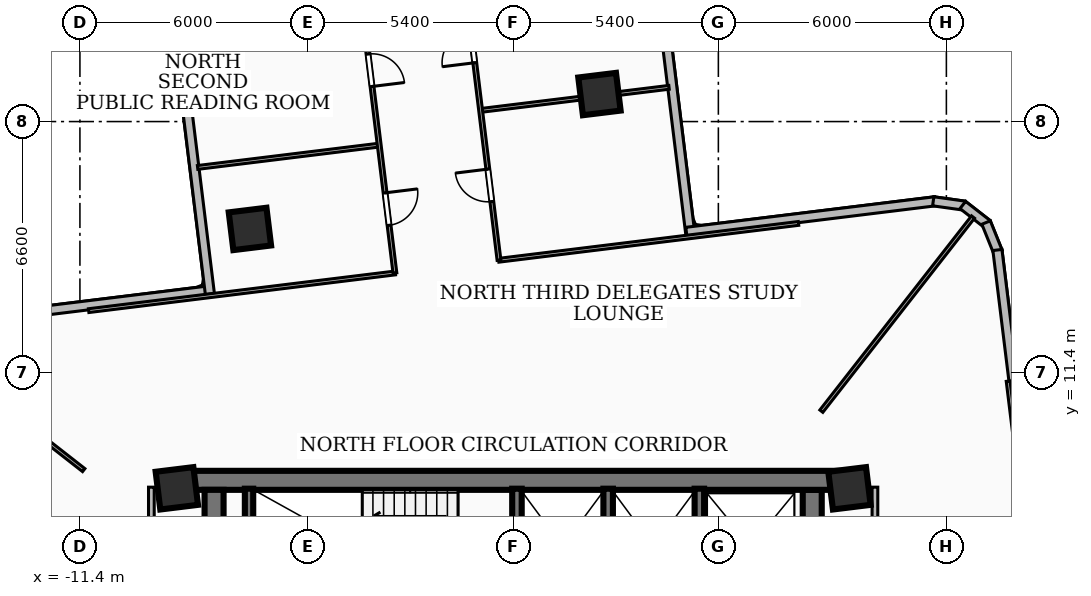
"""IFC4 building model, lengths in metres.
Left out: names, types, materials, properties, quantities, classifications, styles, units other than length and angle.
Written with IfcOpenShell. Run it as: python <this file> out.ifc"""

import sys

from ifc_helpers import new_model, si_unit, direction, frame, frame_2d, origin, origin_2d, place, context, subcontext, project, spatial, rectangle, extrude, element, fill, save


model = new_model("IFC4")
c1 = context("Model", 3, precision=1e-05, world=origin(), true_north=direction((0.0, 1.0)))
c2 = subcontext(c1, "Body", "Model", "MODEL_VIEW")
j1 = project(units=[si_unit("LENGTHUNIT", "METRE"), si_unit("PLANEANGLEUNIT", "RADIAN")], contexts=[c1])
p1 = place(None, origin())
s1 = spatial("IfcSite", under=j1, at=p1, CompositionType="ELEMENT")
p2 = place(p1, origin())
s2 = spatial("IfcBuilding", under=s1, at=p2, CompositionType="ELEMENT")
p3 = place(p2, frame((0.0, 0.0, 82.08)))
s3 = spatial("IfcBuildingStorey", under=s2, at=p3, CompositionType="ELEMENT", Elevation=82.08)
p4 = place(p3, frame((-8.78, 8.56, 0.0), z_axis=(0.0, 0.0, 1.0), x_axis=(1.0, 0.0, 0.0)))
e1 = element("IfcWall", 1, at=p4, inside=s3, PredefinedType="SHEAR", context=c2, shape_type="SweptSolid", body=[
    extrude(rectangle(XDim=17.56, YDim=0.5, at=frame_2d((8.78, 0.0))), origin(), (0.0, 0.0, 1.0), 3.34),
])
for number, where, z_axis, x_axis in (
    (2, (-7.87, 2.0, 0.0), (0.0, 0.0, 1.0), (0.0, 1.0, 0.0)),
    (3, (7.87, 8.31, 0.0), (0.0, 0.0, 1.0), (0.0, -1.0, 0.0)),
):
    element("IfcWall", number, at=place(p3, frame(where, z_axis=z_axis, x_axis=x_axis)), inside=s3, PredefinedType="SHEAR", context=c2, shape_type="SweptSolid", body=[
        extrude(rectangle(XDim=6.31, YDim=0.5, at=frame_2d((3.155, 0.0))), origin(), (0.0, 0.0, 1.0), 3.34),
    ])
p5 = place(p3, frame((-6.95, 5.28, 0.0), z_axis=(0.0, 0.0, 1.0), x_axis=(0.0, 1.0, 0.0)))
e4 = element("IfcWall", 4, at=p5, inside=s3, PredefinedType="SOLIDWALL", context=c2, shape_type="SweptSolid", body=[
    extrude(rectangle(XDim=3.06, YDim=0.22, at=frame_2d((1.53, 0.0))), origin(), (0.0, 0.0, 1.0), 3.34),
])
for number, where, z_axis, x_axis in (
    (5, (0.1, 5.3, 0.0), (0.0, 0.0, 1.0), (0.0, 1.0, 0.0)),
    (6, (2.5, 5.3, 0.0), (0.0, 0.0, 1.0), (0.0, 1.0, 0.0)),
    (7, (4.9, 5.3, 0.0), (0.0, 0.0, 1.0), (0.0, 1.0, 0.0)),
):
    element("IfcWall", number, at=place(p3, frame(where, z_axis=z_axis, x_axis=x_axis)), inside=s3, PredefinedType="SOLIDWALL", context=c2, shape_type="SweptSolid", body=[
        extrude(rectangle(XDim=3.04, YDim=0.25, at=frame_2d((1.52, 0.0))), origin(), (0.0, 0.0, 1.0), 3.34),
    ])
for number, where, z_axis, x_axis in (
    (8, (-8.85, 8.35, 0.0), (0.0, 0.0, 1.0), (0.993, 0.122, 0.0)),
    (9, (8.85, 8.35, 0.0), (0.0, 0.0, 1.0), (0.993, 0.122, 0.0)),
    (10, (2.271, 18.724, 0.0), (0.0, 0.0, 1.0), (0.993, 0.122, 0.0)),
    (11, (-6.927, 15.175, 0.0), (0.0, 0.0, 1.0), (0.993, 0.122, 0.0)),
):
    element("IfcColumn", number, at=place(p3, frame(where, z_axis=z_axis, x_axis=x_axis)), inside=s3, PredefinedType="COLUMN", context=c2, shape_type="SweptSolid", body=[
        extrude(rectangle(XDim=1.0, YDim=1.0, at=origin_2d()), origin(), (0.0, 0.0, 1.0), 3.6),
    ])
p6 = place(p3, frame((-14.621, 12.743, 0.0), z_axis=(0.0, 0.0, 1.0), x_axis=(0.992536263595, 0.121949848087, 0.0)))
e12 = element("IfcWall", 12, at=p6, inside=s3, PredefinedType="SOLIDWALL", context=c2, shape_type="SweptSolid", body=[
    extrude(rectangle(XDim=6.775, YDim=0.24, at=frame_2d((3.387, 0.0))), origin(), (0.0, 0.0, 1.0), 3.34),
])
p7 = place(p3, frame((-7.98, 13.462, 0.0), z_axis=(0.0, 0.0, 1.0), x_axis=(-0.12189689255, 0.992542768644, 0.0)))
e13 = element("IfcWall", 13, at=p7, inside=s3, PredefinedType="SOLIDWALL", context=c2, shape_type="SweptSolid", body=[
    extrude(rectangle(XDim=12.075, YDim=0.24, at=frame_2d((6.038, 0.0))), origin(), (0.0, 0.0, 1.0), 3.34),
])
p8 = place(p7, frame((9.475, 0.0, 0.85)))
e14 = element("IfcOpeningElement", 14, at=p8, cuts=e13, PredefinedType="OPENING", context=c2, shape_type="SweptSolid", body=[
    extrude(rectangle(XDim=1.5, YDim=1.8, at=frame_2d((0.75, 0.9))), frame((0.0, 0.13, 0.0), z_axis=(0.0, -1.0, 0.0), x_axis=(1.0, 0.0, 0.0)), (0.0, 0.0, 1.0), 0.26),
])
p9 = place(p3, frame((3.193, 27.0, 0.0), z_axis=(0.0, 0.0, 1.0), x_axis=(0.12189689255, -0.992542768644, 0.0)))
e15 = element("IfcWall", 15, at=p9, inside=s3, PredefinedType="SOLIDWALL", context=c2, shape_type="SweptSolid", body=[
    extrude(rectangle(XDim=12.075, YDim=0.24, at=frame_2d((6.038, 0.0))), origin(), (0.0, 0.0, 1.0), 2.486),
])
p10 = place(p3, frame((4.558, 15.098, 0.0), z_axis=(0.0, 0.0, 1.0), x_axis=(0.992537639855, 0.121938646341, 0.0)))
e16 = element("IfcWall", 16, at=p10, inside=s3, PredefinedType="SOLIDWALL", context=c2, shape_type="SweptSolid", body=[
    extrude(rectangle(XDim=6.595, YDim=0.24, at=frame_2d((3.298, 0.0))), origin(), (0.0, 0.0, 1.0), 2.486),
])
p11 = place(p3, frame((11.054, 15.902, 0.0), z_axis=(0.0, 0.0, 1.0), x_axis=(0.990379629694, -0.138376981782, 0.0)))
e17 = element("IfcWall", 17, at=p11, inside=s3, PredefinedType="SOLIDWALL", context=c2, shape_type="SweptSolid", body=[
    extrude(rectangle(XDim=0.831, YDim=0.24, at=frame_2d((0.416, 0.0))), origin(), (0.0, 0.0, 1.0), 3.34),
])
p12 = place(p3, frame((11.832, 15.805, 0.0), z_axis=(0.0, 0.0, 1.0), x_axis=(0.788996702001, -0.614397431824, 0.0)))
e18 = element("IfcWall", 18, at=p12, inside=s3, PredefinedType="SOLIDWALL", context=c2, shape_type="SweptSolid", body=[
    extrude(rectangle(XDim=0.814, YDim=0.24, at=frame_2d((0.407, 0.0))), origin(), (0.0, 0.0, 1.0), 3.34),
])
p13 = place(p3, frame((12.445, 15.343, 0.0), z_axis=(0.0, 0.0, 1.0), x_axis=(0.37326634174, -0.927724225254, 0.0)))
e19 = element("IfcWall", 19, at=p13, inside=s3, PredefinedType="SOLIDWALL", context=c2, shape_type="SweptSolid", body=[
    extrude(rectangle(XDim=0.83, YDim=0.24, at=frame_2d((0.415, 0.0))), origin(), (0.0, 0.0, 1.0), 3.34),
])
p14 = place(p3, frame((12.743, 14.621, 0.0), z_axis=(0.0, 0.0, 1.0), x_axis=(0.121949848087, -0.992536263595, 0.0)))
e20 = element("IfcWall", 20, at=p14, inside=s3, PredefinedType="SOLIDWALL", context=c2, shape_type="SweptSolid", body=[
    extrude(rectangle(XDim=6.775, YDim=0.24, at=frame_2d((3.387, 0.0))), origin(), (0.0, 0.0, 1.0), 3.34),
])
for number, where, z_axis, x_axis in (
    (21, (-9.52, 1.75, 0.0), (0.0, 0.0, 1.0), (0.0, 1.0, 0.0)),
    (22, (9.52, 1.75, 0.0), (0.0, 0.0, 1.0), (0.0, 1.0, 0.0)),
):
    element("IfcWall", number, at=place(p3, frame(where, z_axis=z_axis, x_axis=x_axis)), inside=s3, PredefinedType="PARTITIONING", context=c2, shape_type="SweptSolid", body=[
        extrude(rectangle(XDim=6.63, YDim=0.15, at=frame_2d((3.315, 0.0))), origin(), (0.0, 0.0, 1.0), 2.486),
    ])
p15 = place(p3, frame((8.11, 10.38, 0.0), z_axis=(0.0, 0.0, 1.0), x_axis=(0.615665236773, 0.788007814828, 0.0)))
e23 = element("IfcWall", 23, at=p15, inside=s3, PredefinedType="PARTITIONING", context=c2, shape_type="SweptSolid", body=[
    extrude(rectangle(XDim=6.482, YDim=0.1, at=frame_2d((3.241, 0.0))), origin(), (0.0, 0.0, 1.0), 3.34),
])
p16 = place(p3, frame((-11.3, 8.829, 0.0), z_axis=(0.0, 0.0, 1.0), x_axis=(-0.788014623364, 0.61565652223, 0.0)))
e24 = element("IfcWall", 24, at=p16, inside=s3, PredefinedType="PARTITIONING", context=c2, shape_type="SweptSolid", body=[
    extrude(rectangle(XDim=5.315, YDim=0.1, at=frame_2d((2.657, 0.0))), origin(), (0.0, 0.0, 1.0), 3.34),
])
for number, where, z_axis, x_axis in (
    (25, (14.017, 3.101, 0.0), (0.0, 0.0, 1.0), (-0.122, 0.993, 0.0)),
    (26, (-3.101, 14.017, 0.0), (0.0, 0.0, 1.0), (-0.993, -0.122, 0.0)),
):
    element("IfcWall", number, at=place(p3, frame(where, z_axis=z_axis, x_axis=x_axis)), inside=s3, PredefinedType="PARTITIONING", context=c2, shape_type="SweptSolid", body=[
        extrude(rectangle(XDim=8.13, YDim=0.1, at=frame_2d((4.065, 0.0))), origin(), (0.0, 0.0, 1.0), 2.486),
    ])
p17 = place(p3, frame((7.509, 15.32, 0.0), z_axis=(0.0, 0.0, 1.0), x_axis=(-0.992529957607, -0.122001160868, 0.0)))
e27 = element("IfcWall", 27, at=p17, inside=s3, PredefinedType="PARTITIONING", context=c2, shape_type="SweptSolid", body=[
    extrude(rectangle(XDim=7.95, YDim=0.1, at=frame_2d((3.975, 0.0))), origin(), (0.0, 0.0, 1.0), 2.486),
])
p18 = place(p3, frame((-3.544, 17.378, 0.0), z_axis=(0.0, 0.0, 1.0), x_axis=(-0.992530372873, -0.121997782455, 0.0)))
e28 = element("IfcWall", 28, at=p18, inside=s3, PredefinedType="PARTITIONING", context=c2, shape_type="SweptSolid", body=[
    extrude(rectangle(XDim=4.795, YDim=0.1, at=frame_2d((2.397, 0.0))), origin(), (0.0, 0.0, 1.0), 2.486),
])
p19 = place(p3, frame((4.102, 18.901, 0.0), z_axis=(0.0, 0.0, 1.0), x_axis=(-0.992554700093, -0.121799701653, 0.0)))
e29 = element("IfcWall", 29, at=p19, inside=s3, PredefinedType="PARTITIONING", context=c2, shape_type="SweptSolid", body=[
    extrude(rectangle(XDim=4.975, YDim=0.1, at=frame_2d((2.488, 0.0))), origin(), (0.0, 0.0, 1.0), 2.486),
])
p20 = place(p3, frame((-4.008, 21.32, 0.0), z_axis=(0.0, 0.0, 1.0), x_axis=(0.12187066259, -0.992545989665, 0.0)))
e30 = element("IfcWall", 30, at=p20, inside=s3, PredefinedType="PARTITIONING", context=c2, shape_type="SweptSolid", body=[
    extrude(rectangle(XDim=7.36, YDim=0.1, at=frame_2d((3.68, 0.0))), origin(), (0.0, 0.0, 1.0), 3.34),
])
p21 = place(p20, frame((5.235, 0.0, 0.0)))
e31 = element("IfcOpeningElement", 31, at=p21, cuts=e30, PredefinedType="OPENING", context=c2, shape_type="SweptSolid", body=[
    extrude(rectangle(XDim=0.86, YDim=2.04, at=frame_2d((0.43, 1.02))), frame((0.0, 0.06, 0.0), z_axis=(0.0, -1.0, 0.0), x_axis=(1.0, 0.0, 0.0)), (0.0, 0.0, 1.0), 0.12),
])
p22 = place(p20, frame((1.555, 0.0, 0.0)))
e32 = element("IfcOpeningElement", 32, at=p22, cuts=e30, PredefinedType="OPENING", context=c2, shape_type="SweptSolid", body=[
    extrude(rectangle(XDim=0.86, YDim=2.04, at=frame_2d((0.43, 1.02))), frame((0.0, 0.06, 0.0), z_axis=(0.0, -1.0, 0.0), x_axis=(1.0, 0.0, 0.0)), (0.0, 0.0, 1.0), 0.12),
])
p23 = place(p3, frame((-0.372, 14.352, 0.0), z_axis=(0.0, 0.0, 1.0), x_axis=(-0.121874675173, 0.992545496968, 0.0)))
e33 = element("IfcWall", 33, at=p23, inside=s3, PredefinedType="PARTITIONING", context=c2, shape_type="SweptSolid", body=[
    extrude(rectangle(XDim=7.36, YDim=0.1, at=frame_2d((3.68, 0.0))), origin(), (0.0, 0.0, 1.0), 3.34),
])
p24 = place(p23, frame((1.555, 0.0, 0.0)))
e34 = element("IfcOpeningElement", 34, at=p24, cuts=e33, PredefinedType="OPENING", context=c2, shape_type="SweptSolid", body=[
    extrude(rectangle(XDim=0.86, YDim=2.04, at=frame_2d((0.43, 1.02))), frame((0.0, 0.06, 0.0), z_axis=(0.0, -1.0, 0.0), x_axis=(1.0, 0.0, 0.0)), (0.0, 0.0, 1.0), 0.12),
])
p25 = place(p23, frame((5.235, 0.0, 0.0)))
e35 = element("IfcOpeningElement", 35, at=p25, cuts=e33, PredefinedType="OPENING", context=c2, shape_type="SweptSolid", body=[
    extrude(rectangle(XDim=0.86, YDim=2.04, at=frame_2d((0.43, 1.02))), frame((0.0, 0.06, 0.0), z_axis=(0.0, -1.0, 0.0), x_axis=(1.0, 0.0, 0.0)), (0.0, 0.0, 1.0), 0.12),
])
p26 = place(p21, origin())
e36 = element("IfcDoor", 36, at=p26, inside=s3, OperationType="SINGLE_SWING_LEFT", PredefinedType="DOOR", context=c2, shape_type="SweptSolid", body=[
    extrude(rectangle(XDim=0.86, YDim=2.04, at=frame_2d((0.43, 1.02))), frame((0.0, 0.025, 0.0), z_axis=(0.0, -1.0, 0.0), x_axis=(1.0, 0.0, 0.0)), (0.0, 0.0, 1.0), 0.05),
])
fill(e31, e36)
p27 = place(p22, origin())
e37 = element("IfcDoor", 37, at=p27, inside=s3, OperationType="SINGLE_SWING_RIGHT", PredefinedType="DOOR", context=c2, shape_type="SweptSolid", body=[
    extrude(rectangle(XDim=0.86, YDim=2.04, at=frame_2d((0.43, 1.02))), frame((0.0, 0.025, 0.0), z_axis=(0.0, -1.0, 0.0), x_axis=(1.0, 0.0, 0.0)), (0.0, 0.0, 1.0), 0.05),
])
fill(e32, e37)
p28 = place(p24, origin())
e38 = element("IfcDoor", 38, at=p28, inside=s3, OperationType="SINGLE_SWING_RIGHT", PredefinedType="DOOR", context=c2, shape_type="SweptSolid", body=[
    extrude(rectangle(XDim=0.86, YDim=2.04, at=frame_2d((0.43, 1.02))), frame((0.0, 0.025, 0.0), z_axis=(0.0, -1.0, 0.0), x_axis=(1.0, 0.0, 0.0)), (0.0, 0.0, 1.0), 0.05),
])
fill(e34, e38)
p29 = place(p25, origin())
e39 = element("IfcDoor", 39, at=p29, inside=s3, OperationType="SINGLE_SWING_LEFT", PredefinedType="DOOR", context=c2, shape_type="SweptSolid", body=[
    extrude(rectangle(XDim=0.86, YDim=2.04, at=frame_2d((0.43, 1.02))), frame((0.0, 0.025, 0.0), z_axis=(0.0, -1.0, 0.0), x_axis=(1.0, 0.0, 0.0)), (0.0, 0.0, 1.0), 0.05),
])
fill(e35, e39)
save(model, sys.argv[1])
